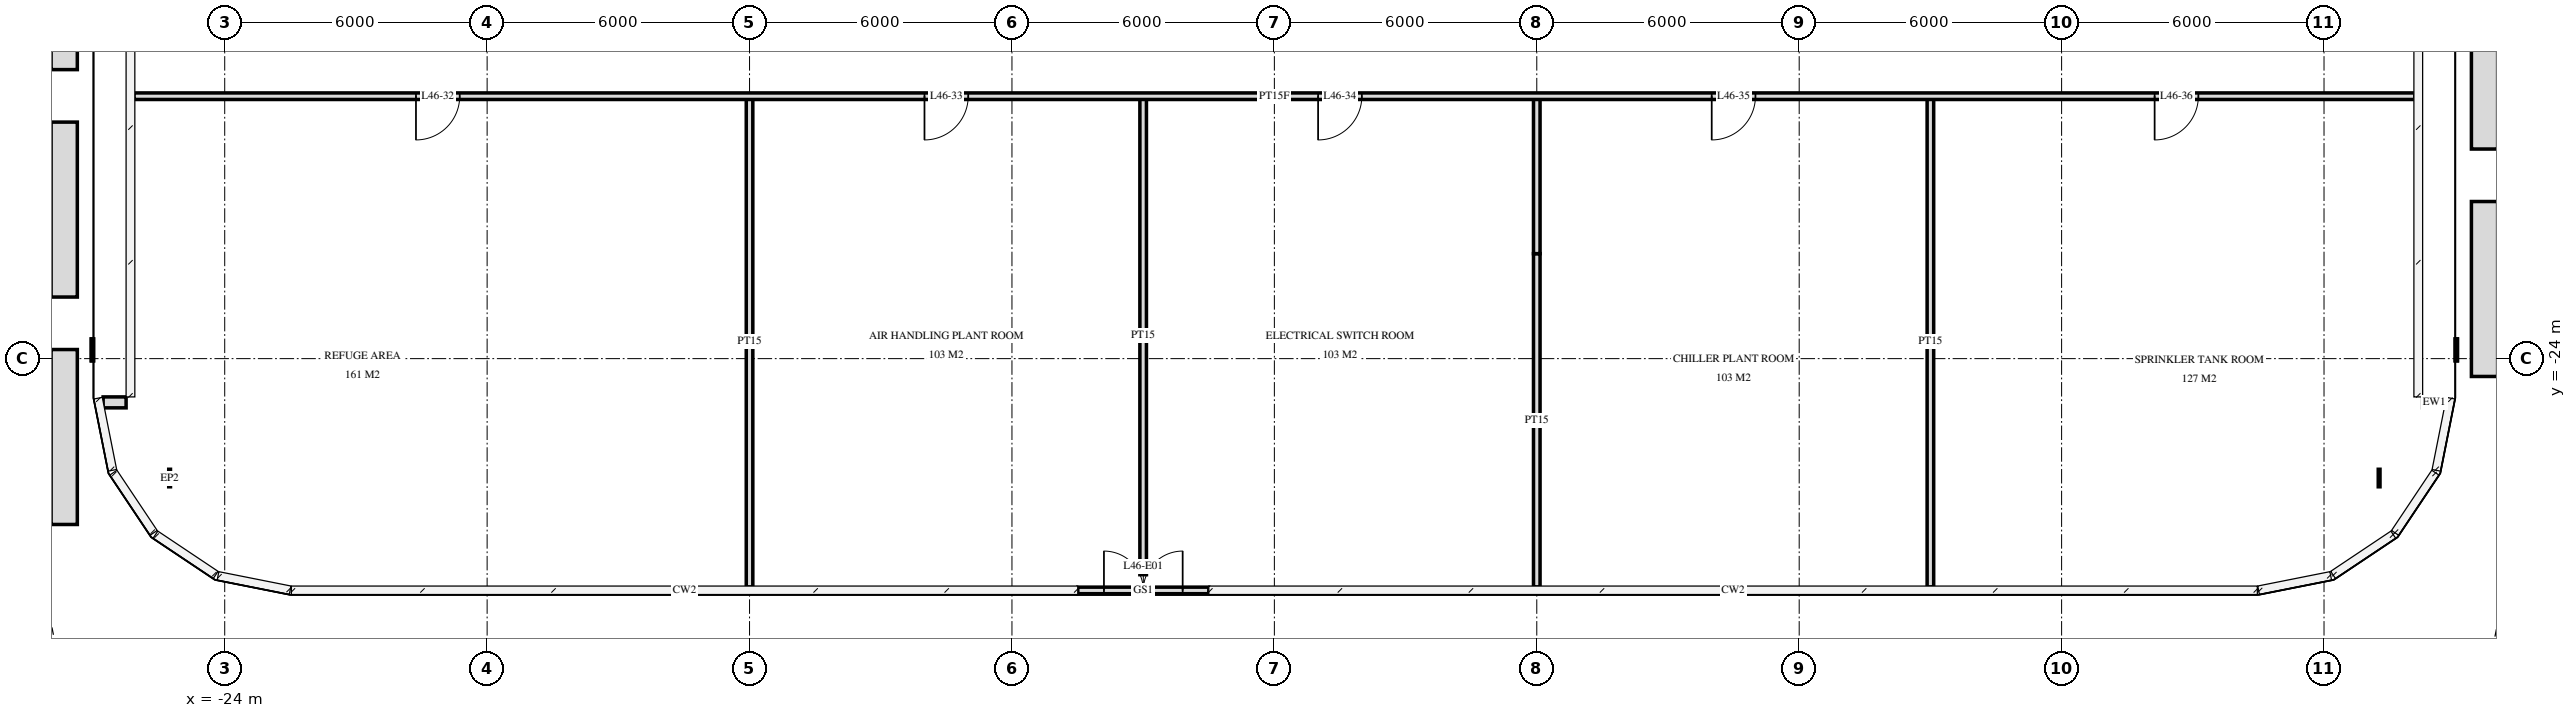
"""IFC4 building model, lengths in metres.
Left out: names, types, materials, properties, quantities, classifications, styles, units other than length and angle.
Written with IfcOpenShell. Run it as: python <this file> out.ifc"""

import sys

from ifc_helpers import new_model, si_unit, direction, frame, frame_2d, origin, place, context, subcontext, project, spatial, rectangle, extrude, element, fill, save


model = new_model("IFC4")
c1 = context("Model", 3, precision=1e-05, world=origin(), true_north=direction((0.0, 1.0)))
c2 = subcontext(c1, "Body", "Model", "MODEL_VIEW")
j1 = project(units=[si_unit("LENGTHUNIT", "METRE"), si_unit("PLANEANGLEUNIT", "RADIAN")], contexts=[c1])
p1 = place(None, origin())
s1 = spatial("IfcSite", under=j1, at=p1, CompositionType="ELEMENT")
p2 = place(p1, origin())
s2 = spatial("IfcBuilding", under=s1, at=p2, CompositionType="ELEMENT")
p3 = place(p2, frame((0.0, 0.0, 177.6)))
s3 = spatial("IfcBuildingStorey", under=s2, at=p3, CompositionType="ELEMENT", Elevation=177.6)
p4 = place(p3, frame((-26.255, -25.0, 0.0), z_axis=(0.0, 0.0, 1.0), x_axis=(-1.0, 0.0, 0.0)))
e1 = element("IfcWall", 1, at=p4, inside=s3, PredefinedType="SOLIDWALL", context=c2, shape_type="SweptSolid", body=[
    extrude(rectangle(XDim=0.525, YDim=0.25, at=frame_2d((0.263, 0.0))), origin(), (0.0, 0.0, 1.0), 5.72),
])
p5 = place(p3, frame((-4.495, -29.3, 0.0), z_axis=(0.0, 0.0, 1.0), x_axis=(1.0, 0.0, 0.0)))
e2 = element("IfcWall", 2, at=p5, inside=s3, PredefinedType="USERDEFINED", context=c2, shape_type="SweptSolid", body=[
    extrude(rectangle(XDim=2.997, YDim=0.15, at=frame_2d((1.499, 0.0))), origin(), (0.0, 0.0, 1.0), 5.72),
])
p6 = place(p5, frame((0.598, 0.0, 0.0)))
e3 = element("IfcOpeningElement", 3, at=p6, cuts=e2, PredefinedType="OPENING", context=c2, shape_type="SweptSolid", body=[
    extrude(rectangle(XDim=1.8, YDim=2.4, at=frame_2d((0.9, 1.2))), frame((0.0, 0.085, 0.0), z_axis=(0.0, -1.0, 0.0), x_axis=(1.0, 0.0, 0.0)), (0.0, 0.0, 1.0), 0.17),
])
p7 = place(p3, frame((26.255, -25.0, 0.0), z_axis=(0.0, 0.0, 1.0), x_axis=(1.0, 0.0, 0.0)))
e4 = element("IfcWall", 4, at=p7, inside=s3, PredefinedType="SOLIDWALL", context=c2, shape_type="SweptSolid", body=[
    extrude(rectangle(XDim=0.525, YDim=0.25, at=frame_2d((0.263, 0.0))), origin(), (0.0, 0.0, 1.0), 5.72),
])
for number, where, z_axis, x_axis in (
    (5, (27.67, -15.208, 0.0), (0.0, 0.0, 1.0), (0.0, -1.0, 0.0)),
    (6, (27.67, -20.408, 0.0), (0.0, 0.0, 1.0), (0.0, -1.0, 0.0)),
    (7, (-27.67, -27.792, 0.0), (0.0, 0.0, 1.0), (0.0, 1.0, 0.0)),
    (8, (-27.67, -22.592, 0.0), (0.0, 0.0, 1.0), (0.0, 1.0, 0.0)),
    (9, (-27.67, -17.392, 0.0), (0.0, 0.0, 1.0), (0.0, 1.0, 0.0)),
):
    element("IfcWall", number, at=place(p3, frame(where, z_axis=z_axis, x_axis=x_axis)), inside=s3, PredefinedType="USERDEFINED", context=c2, shape_type="SweptSolid", body=[
        extrude(rectangle(XDim=4.0, YDim=0.6, at=frame_2d((2.0, 0.0))), origin(), (0.0, 0.0, 1.0), 0.65),
    ])
p8 = place(p3, frame((15.0, -29.22, 0.0), z_axis=(0.0, 0.0, 1.0), x_axis=(0.0, 1.0, 0.0)))
e10 = element("IfcWall", 10, at=p8, inside=s3, PredefinedType="PARTITIONING", context=c2, shape_type="SweptSolid", body=[
    extrude(rectangle(XDim=11.22, YDim=0.15, at=frame_2d((5.61, 0.0))), origin(), (0.0, 0.0, 1.0), 5.7),
])
p9 = place(p3, frame((6.0, -29.22, 0.0), z_axis=(0.0, 0.0, 1.0), x_axis=(0.0, 1.0, 0.0)))
e11 = element("IfcWall", 11, at=p9, inside=s3, PredefinedType="PARTITIONING", context=c2, shape_type="SweptSolid", body=[
    extrude(rectangle(XDim=7.62, YDim=0.15, at=frame_2d((3.81, 0.0))), origin(), (0.0, 0.0, 1.0), 4.52),
])
p10 = place(p3, frame((-3.0, -28.94, 0.0), z_axis=(0.0, 0.0, 1.0), x_axis=(0.0, 1.0, 0.0)))
e12 = element("IfcWall", 12, at=p10, inside=s3, PredefinedType="PARTITIONING", context=c2, shape_type="SweptSolid", body=[
    extrude(rectangle(XDim=10.94, YDim=0.15, at=frame_2d((5.47, 0.0))), origin(), (0.0, 0.0, 1.0), 5.7),
])
p11 = place(p3, frame((-12.0, -29.22, 0.0), z_axis=(0.0, 0.0, 1.0), x_axis=(0.0, 1.0, 0.0)))
e13 = element("IfcWall", 13, at=p11, inside=s3, PredefinedType="PARTITIONING", context=c2, shape_type="SweptSolid", body=[
    extrude(rectangle(XDim=11.22, YDim=0.15, at=frame_2d((5.61, 0.0))), origin(), (0.0, 0.0, 1.0), 4.52),
])
p12 = place(p3, frame((-26.075, -18.0, 0.0), z_axis=(0.0, 0.0, 1.0), x_axis=(1.0, 0.0, 0.0)))
e14 = element("IfcWall", 14, at=p12, inside=s3, PredefinedType="PARTITIONING", context=c2, shape_type="SweptSolid", body=[
    extrude(rectangle(XDim=52.15, YDim=0.15, at=frame_2d((26.075, 0.0))), origin(), (0.0, 0.0, 1.0), 5.7),
])
p13 = place(p12, frame((6.448, 0.0, 0.0)))
e15 = element("IfcOpeningElement", 15, at=p13, cuts=e14, PredefinedType="OPENING", context=c2, shape_type="SweptSolid", body=[
    extrude(rectangle(XDim=1.0, YDim=2.1, at=frame_2d((0.5, 1.05))), frame((0.0, 0.085, 0.0), z_axis=(0.0, -1.0, 0.0), x_axis=(1.0, 0.0, 0.0)), (0.0, 0.0, 1.0), 0.17),
])
p14 = place(p12, frame((18.075, 0.0, 0.0)))
e16 = element("IfcOpeningElement", 16, at=p14, cuts=e14, PredefinedType="OPENING", context=c2, shape_type="SweptSolid", body=[
    extrude(rectangle(XDim=1.0, YDim=2.1, at=frame_2d((0.5, 1.05))), frame((0.0, 0.085, 0.0), z_axis=(0.0, -1.0, 0.0), x_axis=(1.0, 0.0, 0.0)), (0.0, 0.0, 1.0), 0.17),
])
p15 = place(p12, frame((27.075, 0.0, 0.0)))
e17 = element("IfcOpeningElement", 17, at=p15, cuts=e14, PredefinedType="OPENING", context=c2, shape_type="SweptSolid", body=[
    extrude(rectangle(XDim=1.0, YDim=2.1, at=frame_2d((0.5, 1.05))), frame((0.0, 0.085, 0.0), z_axis=(0.0, -1.0, 0.0), x_axis=(1.0, 0.0, 0.0)), (0.0, 0.0, 1.0), 0.17),
])
p16 = place(p12, frame((36.075, 0.0, 0.0)))
e18 = element("IfcOpeningElement", 18, at=p16, cuts=e14, PredefinedType="OPENING", context=c2, shape_type="SweptSolid", body=[
    extrude(rectangle(XDim=1.0, YDim=2.1, at=frame_2d((0.5, 1.05))), frame((0.0, 0.085, 0.0), z_axis=(0.0, -1.0, 0.0), x_axis=(1.0, 0.0, 0.0)), (0.0, 0.0, 1.0), 0.17),
])
p17 = place(p12, frame((46.202, 0.0, 0.0)))
e19 = element("IfcOpeningElement", 19, at=p17, cuts=e14, PredefinedType="OPENING", context=c2, shape_type="SweptSolid", body=[
    extrude(rectangle(XDim=1.0, YDim=2.1, at=frame_2d((0.5, 1.05))), frame((0.0, 0.085, 0.0), z_axis=(0.0, -1.0, 0.0), x_axis=(1.0, 0.0, 0.0)), (0.0, 0.0, 1.0), 0.17),
])
p18 = place(p3, frame((6.0, -21.6, 0.0), z_axis=(0.0, 0.0, 1.0), x_axis=(0.0, 1.0, 0.0)))
e20 = element("IfcWall", 20, at=p18, inside=s3, PredefinedType="PARTITIONING", context=c2, shape_type="SweptSolid", body=[
    extrude(rectangle(XDim=3.6, YDim=0.15, at=frame_2d((1.8, 0.0))), origin(), (0.0, 0.0, 1.0), 5.7),
])
p19 = place(p6, origin())
e21 = element("IfcDoor", 21, at=p19, inside=s3, OperationType="DOUBLE_DOOR_SINGLE_SWING", PredefinedType="DOOR", context=c2, shape_type="SweptSolid", body=[
    extrude(rectangle(XDim=1.8, YDim=2.4, at=frame_2d((0.9, 1.2))), frame((0.0, 0.025, 0.0), z_axis=(0.0, -1.0, 0.0), x_axis=(1.0, 0.0, 0.0)), (0.0, 0.0, 1.0), 0.05),
])
fill(e3, e21)
p20 = place(p13, frame((0.5, 0.0, 0.0), z_axis=(0.0, 0.0, 1.0), x_axis=(-1.0, 0.0, 0.0)))
e22 = element("IfcDoor", 22, at=p20, inside=s3, OperationType="SINGLE_SWING_LEFT", PredefinedType="DOOR", context=c2, shape_type="SweptSolid", body=[
    extrude(rectangle(XDim=1.0, YDim=2.1, at=frame_2d((0.0, 1.05))), frame((0.0, -0.025, 0.0), z_axis=(0.0, 1.0, 0.0), x_axis=(-1.0, 0.0, 0.0)), (0.0, 0.0, 1.0), 0.05),
])
fill(e15, e22)
p21 = place(p14, frame((0.5, 0.0, 0.0), z_axis=(0.0, 0.0, 1.0), x_axis=(-1.0, 0.0, 0.0)))
e23 = element("IfcDoor", 23, at=p21, inside=s3, OperationType="SINGLE_SWING_LEFT", PredefinedType="DOOR", context=c2, shape_type="SweptSolid", body=[
    extrude(rectangle(XDim=1.0, YDim=2.1, at=frame_2d((0.0, 1.05))), frame((0.0, -0.025, 0.0), z_axis=(0.0, 1.0, 0.0), x_axis=(-1.0, 0.0, 0.0)), (0.0, 0.0, 1.0), 0.05),
])
fill(e16, e23)
p22 = place(p15, frame((0.5, 0.0, 0.0), z_axis=(0.0, 0.0, 1.0), x_axis=(-1.0, 0.0, 0.0)))
e24 = element("IfcDoor", 24, at=p22, inside=s3, OperationType="SINGLE_SWING_LEFT", PredefinedType="DOOR", context=c2, shape_type="SweptSolid", body=[
    extrude(rectangle(XDim=1.0, YDim=2.1, at=frame_2d((0.0, 1.05))), frame((0.0, -0.025, 0.0), z_axis=(0.0, 1.0, 0.0), x_axis=(-1.0, 0.0, 0.0)), (0.0, 0.0, 1.0), 0.05),
])
fill(e17, e24)
p23 = place(p16, frame((0.5, 0.0, 0.0), z_axis=(0.0, 0.0, 1.0), x_axis=(-1.0, 0.0, 0.0)))
e25 = element("IfcDoor", 25, at=p23, inside=s3, OperationType="SINGLE_SWING_LEFT", PredefinedType="DOOR", context=c2, shape_type="SweptSolid", body=[
    extrude(rectangle(XDim=1.0, YDim=2.1, at=frame_2d((0.0, 1.05))), frame((0.0, -0.025, 0.0), z_axis=(0.0, 1.0, 0.0), x_axis=(-1.0, 0.0, 0.0)), (0.0, 0.0, 1.0), 0.05),
])
fill(e18, e25)
p24 = place(p17, frame((0.5, 0.0, 0.0), z_axis=(0.0, 0.0, 1.0), x_axis=(-1.0, 0.0, 0.0)))
e26 = element("IfcDoor", 26, at=p24, inside=s3, OperationType="SINGLE_SWING_LEFT", PredefinedType="DOOR", context=c2, shape_type="SweptSolid", body=[
    extrude(rectangle(XDim=1.0, YDim=2.1, at=frame_2d((0.0, 1.05))), frame((0.0, -0.025, 0.0), z_axis=(0.0, 1.0, 0.0), x_axis=(-1.0, 0.0, 0.0)), (0.0, 0.0, 1.0), 0.05),
])
fill(e19, e26)
save(model, sys.argv[1])
